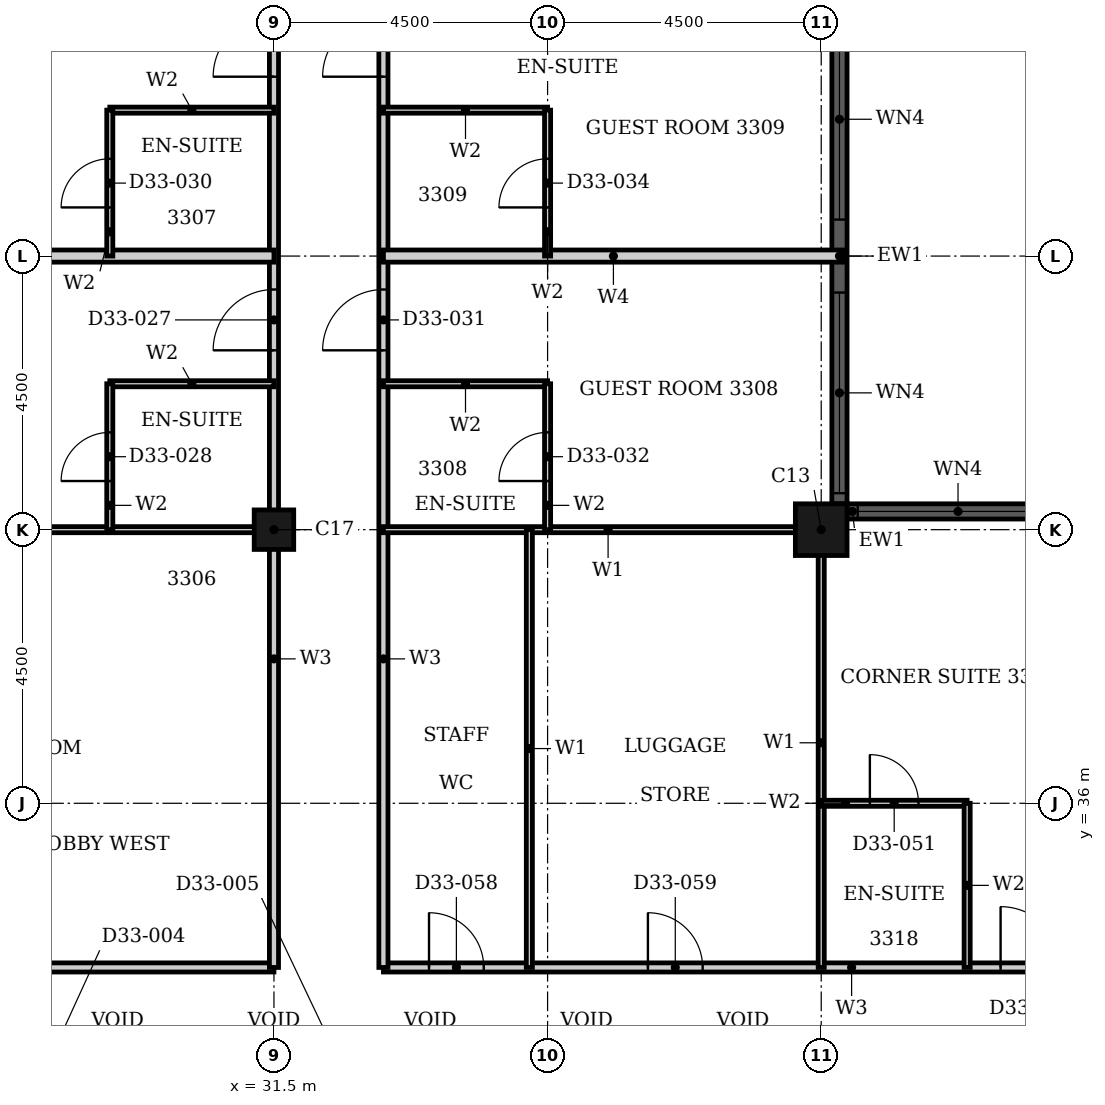
"""IFC4 building model, lengths in metres.
Left out: names, types, materials, properties, quantities, classifications, styles, units other than length and angle.
Written with IfcOpenShell. Run it as: python <this file> out.ifc"""

import sys

from ifc_helpers import new_model, si_unit, direction, frame, frame_2d, origin, origin_2d, place, context, subcontext, project, spatial, rectangle, hollow_rectangle, extrude, element, fill, save


model = new_model("IFC4")
c1 = context("Model", 3, precision=1e-05, world=origin(), true_north=direction((0.0, 1.0)))
c2 = subcontext(c1, "Body", "Model", "MODEL_VIEW")
j1 = project(units=[si_unit("LENGTHUNIT", "METRE"), si_unit("PLANEANGLEUNIT", "RADIAN")], contexts=[c1])
p1 = place(None, origin())
s1 = spatial("IfcSite", under=j1, at=p1, CompositionType="ELEMENT")
p2 = place(p1, origin())
s2 = spatial("IfcBuilding", under=s1, at=p2, CompositionType="ELEMENT")
p3 = place(p2, frame((0.0, 0.0, 133.2)))
s3 = spatial("IfcBuildingStorey", under=s2, at=p3, CompositionType="ELEMENT", Elevation=133.2)
p4 = place(p3, frame((40.5, 40.5, 0.0), z_axis=(0.0, 0.0, 1.0), x_axis=(1.0, 0.0, 0.0)))
e1 = element("IfcColumn", 1, at=p4, inside=s3, PredefinedType="COLUMN", context=c2, shape_type="SweptSolid", body=[
    extrude(hollow_rectangle(XDim=0.85, YDim=0.85, WallThickness=0.026, at=origin_2d()), origin(), (0.0, 0.0, 1.0), 3.6),
])
p5 = place(p3, frame((31.5, 40.5, 0.0), z_axis=(0.0, 0.0, 1.0), x_axis=(1.0, 0.0, 0.0)))
e2 = element("IfcColumn", 2, at=p5, inside=s3, PredefinedType="COLUMN", context=c2, shape_type="SweptSolid", body=[
    extrude(hollow_rectangle(XDim=0.65, YDim=0.65, WallThickness=0.021, at=origin_2d()), origin(), (0.0, 0.0, 1.0), 3.6),
])
p6 = place(p3, frame((44.575, 40.8, 0.0), z_axis=(0.0, 0.0, 1.0), x_axis=(-1.0, 0.0, 0.0)))
e3 = element("IfcWall", 3, at=p6, inside=s3, PredefinedType="SOLIDWALL", context=c2, shape_type="SweptSolid", body=[
    extrude(rectangle(XDim=3.65, YDim=0.25, at=frame_2d((1.825, 0.0))), origin(), (0.0, 0.0, 1.0), 3.6),
])
p7 = place(p6, frame((0.175, 0.0, 0.9)))
e4 = element("IfcOpeningElement", 4, at=p7, cuts=e3, PredefinedType="OPENING", context=c2, shape_type="SweptSolid", body=[
    extrude(rectangle(XDim=3.3, YDim=2.08, at=frame_2d((1.65, 1.04))), frame((0.0, 0.135, 0.0), z_axis=(0.0, -1.0, 0.0), x_axis=(1.0, 0.0, 0.0)), (0.0, 0.0, 1.0), 0.27),
])
p8 = place(p3, frame((40.8, 40.925, 0.0), z_axis=(0.0, 0.0, 1.0), x_axis=(0.0, 1.0, 0.0)))
e5 = element("IfcWall", 5, at=p8, inside=s3, PredefinedType="SOLIDWALL", context=c2, shape_type="SweptSolid", body=[
    extrude(rectangle(XDim=8.15, YDim=0.25, at=frame_2d((4.075, 0.0))), origin(), (0.0, 0.0, 1.0), 3.6),
])
p9 = place(p8, frame((0.175, 0.0, 0.9)))
e6 = element("IfcOpeningElement", 6, at=p9, cuts=e5, PredefinedType="OPENING", context=c2, shape_type="SweptSolid", body=[
    extrude(rectangle(XDim=3.3, YDim=2.08, at=frame_2d((1.65, 1.04))), frame((0.0, 0.135, 0.0), z_axis=(0.0, -1.0, 0.0), x_axis=(1.0, 0.0, 0.0)), (0.0, 0.0, 1.0), 0.27),
])
p10 = place(p8, frame((4.675, 0.0, 0.9)))
e7 = element("IfcOpeningElement", 7, at=p10, cuts=e5, PredefinedType="OPENING", context=c2, shape_type="SweptSolid", body=[
    extrude(rectangle(XDim=3.3, YDim=2.08, at=frame_2d((1.65, 1.04))), frame((0.0, 0.135, 0.0), z_axis=(0.0, -1.0, 0.0), x_axis=(1.0, 0.0, 0.0)), (0.0, 0.0, 1.0), 0.27),
])
p11 = place(p3, frame((16.2, 33.3, 0.0), z_axis=(0.0, 0.0, 1.0), x_axis=(1.0, 0.0, 0.0)))
e8 = element("IfcWall", 8, at=p11, inside=s3, PredefinedType="PARTITIONING", context=c2, shape_type="SweptSolid", body=[
    extrude(rectangle(XDim=15.3, YDim=0.15, at=frame_2d((7.65, 0.0))), origin(), (0.0, 0.0, 1.0), 3.3),
])
p12 = place(p11, frame((4.75, 0.0, 0.0)))
e9 = element("IfcOpeningElement", 9, at=p12, cuts=e8, PredefinedType="OPENING", context=c2, shape_type="SweptSolid", body=[
    extrude(rectangle(XDim=1.0, YDim=2.1, at=frame_2d((0.5, 1.05))), frame((0.0, 0.085, 0.0), z_axis=(0.0, -1.0, 0.0), x_axis=(1.0, 0.0, 0.0)), (0.0, 0.0, 1.0), 0.17),
])
p13 = place(p11, frame((10.35, 0.0, 0.0)))
e10 = element("IfcOpeningElement", 10, at=p13, cuts=e8, PredefinedType="OPENING", context=c2, shape_type="SweptSolid", body=[
    extrude(rectangle(XDim=0.9, YDim=2.1, at=frame_2d((0.45, 1.05))), frame((0.0, 0.085, 0.0), z_axis=(0.0, -1.0, 0.0), x_axis=(1.0, 0.0, 0.0)), (0.0, 0.0, 1.0), 0.17),
])
p14 = place(p3, frame((33.3, 33.3, 0.0), z_axis=(0.0, 0.0, 1.0), x_axis=(1.0, 0.0, 0.0)))
e11 = element("IfcWall", 11, at=p14, inside=s3, PredefinedType="PARTITIONING", context=c2, shape_type="SweptSolid", body=[
    extrude(rectangle(XDim=13.5, YDim=0.15, at=frame_2d((6.75, 0.0))), origin(), (0.0, 0.0, 1.0), 3.3),
])
p15 = place(p14, frame((10.15, 0.0, 0.0)))
e12 = element("IfcOpeningElement", 12, at=p15, cuts=e11, PredefinedType="OPENING", context=c2, shape_type="SweptSolid", body=[
    extrude(rectangle(XDim=1.0, YDim=2.1, at=frame_2d((0.5, 1.05))), frame((0.0, 0.085, 0.0), z_axis=(0.0, -1.0, 0.0), x_axis=(1.0, 0.0, 0.0)), (0.0, 0.0, 1.0), 0.17),
])
p16 = place(p14, frame((0.75, 0.0, 0.0)))
e13 = element("IfcOpeningElement", 13, at=p16, cuts=e11, PredefinedType="OPENING", context=c2, shape_type="SweptSolid", body=[
    extrude(rectangle(XDim=0.9, YDim=2.1, at=frame_2d((0.45, 1.05))), frame((0.0, 0.085, 0.0), z_axis=(0.0, -1.0, 0.0), x_axis=(1.0, 0.0, 0.0)), (0.0, 0.0, 1.0), 0.17),
])
p17 = place(p14, frame((4.35, 0.0, 0.0)))
e14 = element("IfcOpeningElement", 14, at=p17, cuts=e11, PredefinedType="OPENING", context=c2, shape_type="SweptSolid", body=[
    extrude(rectangle(XDim=0.9, YDim=2.1, at=frame_2d((0.45, 1.05))), frame((0.0, 0.085, 0.0), z_axis=(0.0, -1.0, 0.0), x_axis=(1.0, 0.0, 0.0)), (0.0, 0.0, 1.0), 0.17),
])
p18 = place(p3, frame((31.5, 33.3, 0.0), z_axis=(0.0, 0.0, 1.0), x_axis=(0.0, 1.0, 0.0)))
e15 = element("IfcWall", 15, at=p18, inside=s3, PredefinedType="PARTITIONING", context=c2, shape_type="SweptSolid", body=[
    extrude(rectangle(XDim=16.2, YDim=0.15, at=frame_2d((8.1, 0.0))), origin(), (0.0, 0.0, 1.0), 2.58),
])
p19 = place(p18, frame((10.15, 0.0, 0.0)))
e16 = element("IfcOpeningElement", 16, at=p19, cuts=e15, PredefinedType="OPENING", context=c2, shape_type="SweptSolid", body=[
    extrude(rectangle(XDim=1.0, YDim=2.1, at=frame_2d((0.5, 1.05))), frame((0.0, 0.085, 0.0), z_axis=(0.0, -1.0, 0.0), x_axis=(1.0, 0.0, 0.0)), (0.0, 0.0, 1.0), 0.17),
])
p20 = place(p18, frame((14.65, 0.0, 0.0)))
e17 = element("IfcOpeningElement", 17, at=p20, cuts=e15, PredefinedType="OPENING", context=c2, shape_type="SweptSolid", body=[
    extrude(rectangle(XDim=1.0, YDim=2.1, at=frame_2d((0.5, 1.05))), frame((0.0, 0.085, 0.0), z_axis=(0.0, -1.0, 0.0), x_axis=(1.0, 0.0, 0.0)), (0.0, 0.0, 1.0), 0.17),
])
p21 = place(p3, frame((33.3, 33.3, 0.0), z_axis=(0.0, 0.0, 1.0), x_axis=(0.0, 1.0, 0.0)))
e18 = element("IfcWall", 18, at=p21, inside=s3, PredefinedType="PARTITIONING", context=c2, shape_type="SweptSolid", body=[
    extrude(rectangle(XDim=16.2, YDim=0.15, at=frame_2d((8.1, 0.0))), origin(), (0.0, 0.0, 1.0), 3.3),
])
p22 = place(p21, frame((10.15, 0.0, 0.0)))
e19 = element("IfcOpeningElement", 19, at=p22, cuts=e18, PredefinedType="OPENING", context=c2, shape_type="SweptSolid", body=[
    extrude(rectangle(XDim=1.0, YDim=2.1, at=frame_2d((0.5, 1.05))), frame((0.0, 0.085, 0.0), z_axis=(0.0, -1.0, 0.0), x_axis=(1.0, 0.0, 0.0)), (0.0, 0.0, 1.0), 0.17),
])
p23 = place(p21, frame((14.65, 0.0, 0.0)))
e20 = element("IfcOpeningElement", 20, at=p23, cuts=e18, PredefinedType="OPENING", context=c2, shape_type="SweptSolid", body=[
    extrude(rectangle(XDim=1.0, YDim=2.1, at=frame_2d((0.5, 1.05))), frame((0.0, 0.085, 0.0), z_axis=(0.0, -1.0, 0.0), x_axis=(1.0, 0.0, 0.0)), (0.0, 0.0, 1.0), 0.17),
])
p24 = place(p3, frame((33.3, 40.5, 0.0), z_axis=(0.0, 0.0, 1.0), x_axis=(1.0, 0.0, 0.0)))
e21 = element("IfcWall", 21, at=p24, inside=s3, PredefinedType="PARTITIONING", context=c2, shape_type="SweptSolid", body=[
    extrude(rectangle(XDim=7.39, YDim=0.1, at=frame_2d((3.695, 0.0))), origin(), (0.0, 0.0, 1.0), 2.38),
])
p25 = place(p3, frame((22.31, 40.5, 0.0), z_axis=(0.0, 0.0, 1.0), x_axis=(1.0, 0.0, 0.0)))
e22 = element("IfcWall", 22, at=p25, inside=s3, PredefinedType="PARTITIONING", context=c2, shape_type="SweptSolid", body=[
    extrude(rectangle(XDim=9.19, YDim=0.1, at=frame_2d((4.595, 0.0))), origin(), (0.0, 0.0, 1.0), 2.38),
])
p26 = place(p3, frame((35.7, 33.3, 0.0), z_axis=(0.0, 0.0, 1.0), x_axis=(0.0, 1.0, 0.0)))
e23 = element("IfcWall", 23, at=p26, inside=s3, PredefinedType="PARTITIONING", context=c2, shape_type="SweptSolid", body=[
    extrude(rectangle(XDim=7.2, YDim=0.1, at=frame_2d((3.6, 0.0))), origin(), (0.0, 0.0, 1.0), 3.3),
])
p27 = place(p3, frame((40.5, 33.3, 0.0), z_axis=(0.0, 0.0, 1.0), x_axis=(0.0, 1.0, 0.0)))
e24 = element("IfcWall", 24, at=p27, inside=s3, PredefinedType="PARTITIONING", context=c2, shape_type="SweptSolid", body=[
    extrude(rectangle(XDim=7.39, YDim=0.1, at=frame_2d((3.695, 0.0))), origin(), (0.0, 0.0, 1.0), 3.3),
])
p28 = place(p3, frame((33.3, 45.0, 0.0), z_axis=(0.0, 0.0, 1.0), x_axis=(1.0, 0.0, 0.0)))
e25 = element("IfcWall", 25, at=p28, inside=s3, PredefinedType="PARTITIONING", context=c2, shape_type="SweptSolid", body=[
    extrude(rectangle(XDim=7.565, YDim=0.2, at=frame_2d((3.782, 0.0))), origin(), (0.0, 0.0, 1.0), 3.3),
])
p29 = place(p3, frame((22.135, 45.0, 0.0), z_axis=(0.0, 0.0, 1.0), x_axis=(1.0, 0.0, 0.0)))
e26 = element("IfcWall", 26, at=p29, inside=s3, PredefinedType="PARTITIONING", context=c2, shape_type="SweptSolid", body=[
    extrude(rectangle(XDim=9.365, YDim=0.2, at=frame_2d((4.683, 0.0))), origin(), (0.0, 0.0, 1.0), 3.3),
])
p30 = place(p3, frame((40.5, 36.0, 0.0), z_axis=(0.0, 0.0, 1.0), x_axis=(1.0, 0.0, 0.0)))
e27 = element("IfcWall", 27, at=p30, inside=s3, PredefinedType="PARTITIONING", context=c2, shape_type="SweptSolid", body=[
    extrude(rectangle(XDim=2.4, YDim=0.1, at=frame_2d((1.2, 0.0))), origin(), (0.0, 0.0, 1.0), 3.3),
])
p31 = place(p30, frame((0.8, 0.0, 0.0)))
e28 = element("IfcOpeningElement", 28, at=p31, cuts=e27, PredefinedType="OPENING", context=c2, shape_type="SweptSolid", body=[
    extrude(rectangle(XDim=0.8, YDim=2.1, at=frame_2d((0.4, 1.05))), frame((0.0, 0.06, 0.0), z_axis=(0.0, -1.0, 0.0), x_axis=(1.0, 0.0, 0.0)), (0.0, 0.0, 1.0), 0.12),
])
for number, where, z_axis, x_axis in (
    (29, (33.3, 42.9, 0.0), (0.0, 0.0, 1.0), (1.0, 0.0, 0.0)),
    (30, (28.8, 42.9, 0.0), (0.0, 0.0, 1.0), (1.0, 0.0, 0.0)),
    (31, (33.3, 47.4, 0.0), (0.0, 0.0, 1.0), (1.0, 0.0, 0.0)),
    (32, (28.8, 47.4, 0.0), (0.0, 0.0, 1.0), (1.0, 0.0, 0.0)),
):
    element("IfcWall", number, at=place(p3, frame(where, z_axis=z_axis, x_axis=x_axis)), inside=s3, PredefinedType="PARTITIONING", context=c2, shape_type="SweptSolid", body=[
        extrude(rectangle(XDim=2.7, YDim=0.1, at=frame_2d((1.35, 0.0))), origin(), (0.0, 0.0, 1.0), 3.3),
    ])
p32 = place(p3, frame((28.8, 40.5, 0.0), z_axis=(0.0, 0.0, 1.0), x_axis=(0.0, 1.0, 0.0)))
e33 = element("IfcWall", 33, at=p32, inside=s3, PredefinedType="PARTITIONING", context=c2, shape_type="SweptSolid", body=[
    extrude(rectangle(XDim=2.4, YDim=0.1, at=frame_2d((1.2, 0.0))), origin(), (0.0, 0.0, 1.0), 3.3),
])
p33 = place(p32, frame((0.8, 0.0, 0.0)))
e34 = element("IfcOpeningElement", 34, at=p33, cuts=e33, PredefinedType="OPENING", context=c2, shape_type="SweptSolid", body=[
    extrude(rectangle(XDim=0.8, YDim=2.1, at=frame_2d((0.4, 1.05))), frame((0.0, 0.06, 0.0), z_axis=(0.0, -1.0, 0.0), x_axis=(1.0, 0.0, 0.0)), (0.0, 0.0, 1.0), 0.12),
])
p34 = place(p3, frame((28.8, 45.0, 0.0), z_axis=(0.0, 0.0, 1.0), x_axis=(0.0, 1.0, 0.0)))
e35 = element("IfcWall", 35, at=p34, inside=s3, PredefinedType="PARTITIONING", context=c2, shape_type="SweptSolid", body=[
    extrude(rectangle(XDim=2.4, YDim=0.1, at=frame_2d((1.2, 0.0))), origin(), (0.0, 0.0, 1.0), 3.3),
])
p35 = place(p34, frame((0.8, 0.0, 0.0)))
e36 = element("IfcOpeningElement", 36, at=p35, cuts=e35, PredefinedType="OPENING", context=c2, shape_type="SweptSolid", body=[
    extrude(rectangle(XDim=0.8, YDim=2.1, at=frame_2d((0.4, 1.05))), frame((0.0, 0.06, 0.0), z_axis=(0.0, -1.0, 0.0), x_axis=(1.0, 0.0, 0.0)), (0.0, 0.0, 1.0), 0.12),
])
p36 = place(p3, frame((36.0, 40.5, 0.0), z_axis=(0.0, 0.0, 1.0), x_axis=(0.0, 1.0, 0.0)))
e37 = element("IfcWall", 37, at=p36, inside=s3, PredefinedType="PARTITIONING", context=c2, shape_type="SweptSolid", body=[
    extrude(rectangle(XDim=2.4, YDim=0.1, at=frame_2d((1.2, 0.0))), origin(), (0.0, 0.0, 1.0), 2.58),
])
p37 = place(p36, frame((0.8, 0.0, 0.0)))
e38 = element("IfcOpeningElement", 38, at=p37, cuts=e37, PredefinedType="OPENING", context=c2, shape_type="SweptSolid", body=[
    extrude(rectangle(XDim=0.8, YDim=2.1, at=frame_2d((0.4, 1.05))), frame((0.0, 0.06, 0.0), z_axis=(0.0, -1.0, 0.0), x_axis=(1.0, 0.0, 0.0)), (0.0, 0.0, 1.0), 0.12),
])
p38 = place(p3, frame((36.0, 45.0, 0.0), z_axis=(0.0, 0.0, 1.0), x_axis=(0.0, 1.0, 0.0)))
e39 = element("IfcWall", 39, at=p38, inside=s3, PredefinedType="PARTITIONING", context=c2, shape_type="SweptSolid", body=[
    extrude(rectangle(XDim=2.4, YDim=0.1, at=frame_2d((1.2, 0.0))), origin(), (0.0, 0.0, 1.0), 2.58),
])
p39 = place(p38, frame((0.8, 0.0, 0.0)))
e40 = element("IfcOpeningElement", 40, at=p39, cuts=e39, PredefinedType="OPENING", context=c2, shape_type="SweptSolid", body=[
    extrude(rectangle(XDim=0.8, YDim=2.1, at=frame_2d((0.4, 1.05))), frame((0.0, 0.06, 0.0), z_axis=(0.0, -1.0, 0.0), x_axis=(1.0, 0.0, 0.0)), (0.0, 0.0, 1.0), 0.12),
])
p40 = place(p3, frame((42.9, 33.3, 0.0), z_axis=(0.0, 0.0, 1.0), x_axis=(0.0, 1.0, 0.0)))
e41 = element("IfcWall", 41, at=p40, inside=s3, PredefinedType="PARTITIONING", context=c2, shape_type="SweptSolid", body=[
    extrude(rectangle(XDim=2.7, YDim=0.1, at=frame_2d((1.35, 0.0))), origin(), (0.0, 0.0, 1.0), 3.3),
])
p41 = place(p7, origin())
e42 = element("IfcWindow", 42, at=p41, inside=s3, PartitioningType="SINGLE_PANEL", PredefinedType="WINDOW", context=c2, shape_type="SweptSolid", body=[
    extrude(rectangle(XDim=3.3, YDim=2.08, at=frame_2d((1.65, 1.04))), frame((0.0, 0.03, 0.0), z_axis=(0.0, -1.0, 0.0), x_axis=(1.0, 0.0, 0.0)), (0.0, 0.0, 1.0), 0.06),
])
fill(e4, e42)
p42 = place(p9, origin())
e43 = element("IfcWindow", 43, at=p42, inside=s3, PartitioningType="SINGLE_PANEL", PredefinedType="WINDOW", context=c2, shape_type="SweptSolid", body=[
    extrude(rectangle(XDim=3.3, YDim=2.08, at=frame_2d((1.65, 1.04))), frame((0.0, 0.03, 0.0), z_axis=(0.0, -1.0, 0.0), x_axis=(1.0, 0.0, 0.0)), (0.0, 0.0, 1.0), 0.06),
])
fill(e6, e43)
p43 = place(p10, origin())
e44 = element("IfcWindow", 44, at=p43, inside=s3, PartitioningType="SINGLE_PANEL", PredefinedType="WINDOW", context=c2, shape_type="SweptSolid", body=[
    extrude(rectangle(XDim=3.3, YDim=2.08, at=frame_2d((1.65, 1.04))), frame((0.0, 0.03, 0.0), z_axis=(0.0, -1.0, 0.0), x_axis=(1.0, 0.0, 0.0)), (0.0, 0.0, 1.0), 0.06),
])
fill(e7, e44)
p44 = place(p19, origin())
e45 = element("IfcDoor", 45, at=p44, inside=s3, OperationType="SINGLE_SWING_RIGHT", PredefinedType="DOOR", context=c2, shape_type="SweptSolid", body=[
    extrude(rectangle(XDim=1.0, YDim=2.1, at=frame_2d((0.5, 1.05))), frame((0.0, 0.025, 0.0), z_axis=(0.0, -1.0, 0.0), x_axis=(1.0, 0.0, 0.0)), (0.0, 0.0, 1.0), 0.05),
])
fill(e16, e45)
p45 = place(p33, origin())
e46 = element("IfcDoor", 46, at=p45, inside=s3, OperationType="SINGLE_SWING_RIGHT", PredefinedType="DOOR", context=c2, shape_type="SweptSolid", body=[
    extrude(rectangle(XDim=0.8, YDim=2.1, at=frame_2d((0.4, 1.05))), frame((0.0, 0.025, 0.0), z_axis=(0.0, -1.0, 0.0), x_axis=(1.0, 0.0, 0.0)), (0.0, 0.0, 1.0), 0.05),
])
fill(e34, e46)
p46 = place(p20, origin())
e47 = element("IfcDoor", 47, at=p46, inside=s3, OperationType="SINGLE_SWING_RIGHT", PredefinedType="DOOR", context=c2, shape_type="SweptSolid", body=[
    extrude(rectangle(XDim=1.0, YDim=2.1, at=frame_2d((0.5, 1.05))), frame((0.0, 0.025, 0.0), z_axis=(0.0, -1.0, 0.0), x_axis=(1.0, 0.0, 0.0)), (0.0, 0.0, 1.0), 0.05),
])
fill(e17, e47)
p47 = place(p35, origin())
e48 = element("IfcDoor", 48, at=p47, inside=s3, OperationType="SINGLE_SWING_RIGHT", PredefinedType="DOOR", context=c2, shape_type="SweptSolid", body=[
    extrude(rectangle(XDim=0.8, YDim=2.1, at=frame_2d((0.4, 1.05))), frame((0.0, 0.025, 0.0), z_axis=(0.0, -1.0, 0.0), x_axis=(1.0, 0.0, 0.0)), (0.0, 0.0, 1.0), 0.05),
])
fill(e36, e48)
p48 = place(p22, origin())
e49 = element("IfcDoor", 49, at=p48, inside=s3, OperationType="SINGLE_SWING_RIGHT", PredefinedType="DOOR", context=c2, shape_type="SweptSolid", body=[
    extrude(rectangle(XDim=1.0, YDim=2.1, at=frame_2d((0.5, 1.05))), frame((0.0, 0.025, 0.0), z_axis=(0.0, -1.0, 0.0), x_axis=(1.0, 0.0, 0.0)), (0.0, 0.0, 1.0), 0.05),
])
fill(e19, e49)
p49 = place(p37, origin())
e50 = element("IfcDoor", 50, at=p49, inside=s3, OperationType="SINGLE_SWING_LEFT", PredefinedType="DOOR", context=c2, shape_type="SweptSolid", body=[
    extrude(rectangle(XDim=0.8, YDim=2.1, at=frame_2d((0.4, 1.05))), frame((0.0, 0.025, 0.0), z_axis=(0.0, -1.0, 0.0), x_axis=(1.0, 0.0, 0.0)), (0.0, 0.0, 1.0), 0.05),
])
fill(e38, e50)
p50 = place(p23, origin())
e51 = element("IfcDoor", 51, at=p50, inside=s3, OperationType="SINGLE_SWING_RIGHT", PredefinedType="DOOR", context=c2, shape_type="SweptSolid", body=[
    extrude(rectangle(XDim=1.0, YDim=2.1, at=frame_2d((0.5, 1.05))), frame((0.0, 0.025, 0.0), z_axis=(0.0, -1.0, 0.0), x_axis=(1.0, 0.0, 0.0)), (0.0, 0.0, 1.0), 0.05),
])
fill(e20, e51)
p51 = place(p39, origin())
e52 = element("IfcDoor", 52, at=p51, inside=s3, OperationType="SINGLE_SWING_RIGHT", PredefinedType="DOOR", context=c2, shape_type="SweptSolid", body=[
    extrude(rectangle(XDim=0.8, YDim=2.1, at=frame_2d((0.4, 1.05))), frame((0.0, 0.025, 0.0), z_axis=(0.0, -1.0, 0.0), x_axis=(1.0, 0.0, 0.0)), (0.0, 0.0, 1.0), 0.05),
])
fill(e40, e52)
p52 = place(p15, origin())
e53 = element("IfcDoor", 53, at=p52, inside=s3, OperationType="SINGLE_SWING_RIGHT", PredefinedType="DOOR", context=c2, shape_type="SweptSolid", body=[
    extrude(rectangle(XDim=1.0, YDim=2.1, at=frame_2d((0.5, 1.05))), frame((0.0, 0.025, 0.0), z_axis=(0.0, -1.0, 0.0), x_axis=(1.0, 0.0, 0.0)), (0.0, 0.0, 1.0), 0.05),
])
fill(e12, e53)
p53 = place(p31, origin())
e54 = element("IfcDoor", 54, at=p53, inside=s3, OperationType="SINGLE_SWING_LEFT", PredefinedType="DOOR", context=c2, shape_type="SweptSolid", body=[
    extrude(rectangle(XDim=0.8, YDim=2.1, at=frame_2d((0.4, 1.05))), frame((0.0, 0.025, 0.0), z_axis=(0.0, -1.0, 0.0), x_axis=(1.0, 0.0, 0.0)), (0.0, 0.0, 1.0), 0.05),
])
fill(e28, e54)
p54 = place(p16, origin())
e55 = element("IfcDoor", 55, at=p54, inside=s3, OperationType="SINGLE_SWING_RIGHT", PredefinedType="DOOR", context=c2, shape_type="SweptSolid", body=[
    extrude(rectangle(XDim=0.9, YDim=2.1, at=frame_2d((0.45, 1.05))), frame((0.0, 0.025, 0.0), z_axis=(0.0, -1.0, 0.0), x_axis=(1.0, 0.0, 0.0)), (0.0, 0.0, 1.0), 0.05),
])
fill(e13, e55)
p55 = place(p17, origin())
e56 = element("IfcDoor", 56, at=p55, inside=s3, OperationType="SINGLE_SWING_LEFT", PredefinedType="DOOR", context=c2, shape_type="SweptSolid", body=[
    extrude(rectangle(XDim=0.9, YDim=2.1, at=frame_2d((0.45, 1.05))), frame((0.0, 0.025, 0.0), z_axis=(0.0, -1.0, 0.0), x_axis=(1.0, 0.0, 0.0)), (0.0, 0.0, 1.0), 0.05),
])
fill(e14, e56)
save(model, sys.argv[1])
